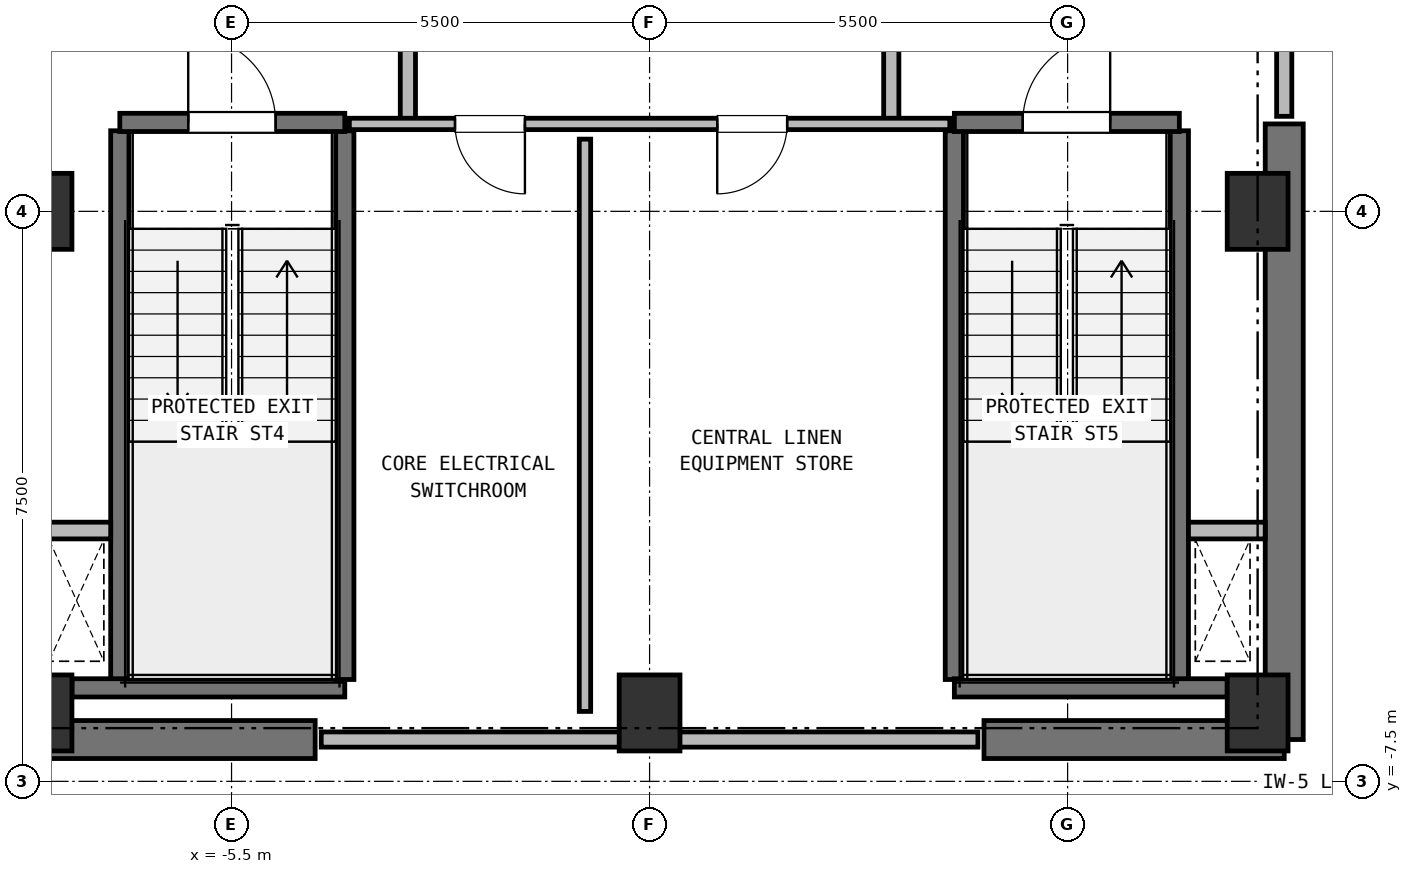
"""IFC4 building model, lengths in metres.
Left out: names, types, materials, properties, quantities, classifications, styles, units other than length and angle.
Written with IfcOpenShell. Run it as: python <this file> out.ifc"""

import sys

from ifc_helpers import new_model, si_unit, direction, frame, frame_2d, origin, origin_2d, place, context, subcontext, project, spatial, rectangle, extrude, element, fill, save


model = new_model("IFC4")
c1 = context("Model", 3, precision=1e-05, world=origin(), true_north=direction((0.0, 1.0)))
c2 = subcontext(c1, "Body", "Model", "MODEL_VIEW")
j1 = project(units=[si_unit("LENGTHUNIT", "METRE"), si_unit("PLANEANGLEUNIT", "RADIAN")], contexts=[c1])
p1 = place(None, origin())
s1 = spatial("IfcSite", under=j1, at=p1, CompositionType="ELEMENT")
p2 = place(p1, origin())
s2 = spatial("IfcBuilding", under=s1, at=p2, CompositionType="ELEMENT")
p3 = place(p2, frame((0.0, 0.0, 205.55)))
s3 = spatial("IfcBuildingStorey", under=s2, at=p3, CompositionType="ELEMENT", Elevation=205.55)
for number, where, z_axis, x_axis in (
    (1, (-8.0, -6.6, 0.0), (0.0, 0.0, 1.0), (1.0, 0.0, 0.0)),
    (2, (0.0, -6.6, 0.0), (0.0, 0.0, 1.0), (1.0, 0.0, 0.0)),
    (3, (8.0, -6.6, 0.0), (0.0, 0.0, 1.0), (1.0, 0.0, 0.0)),
    (4, (8.0, 0.0, 0.0), (0.0, 0.0, 1.0), (1.0, 0.0, 0.0)),
    (5, (-8.0, 0.0, 0.0), (0.0, 0.0, 1.0), (1.0, 0.0, 0.0)),
):
    element("IfcColumn", number, at=place(p3, frame(where, z_axis=z_axis, x_axis=x_axis)), inside=s3, PredefinedType="COLUMN", context=c2, shape_type="SweptSolid", body=[
        extrude(rectangle(XDim=0.8, YDim=1.0, at=origin_2d()), origin(), (0.0, 0.0, 1.0), 3.8),
    ])
for number, where, z_axis, x_axis in (
    (6, (-8.35, -6.95, 0.0), (0.0, 0.0, 1.0), (1.0, 0.0, 0.0)),
    (7, (4.4, -6.95, 0.0), (0.0, 0.0, 1.0), (1.0, 0.0, 0.0)),
):
    element("IfcWall", number, at=place(p3, frame(where, z_axis=z_axis, x_axis=x_axis)), inside=s3, PredefinedType="SHEAR", context=c2, shape_type="SweptSolid", body=[
        extrude(rectangle(XDim=3.95, YDim=0.5, at=frame_2d((1.975, 0.0))), origin(), (0.0, 0.0, 1.0), 3.55),
    ])
p4 = place(p3, frame((8.35, -6.95, 0.0), z_axis=(0.0, 0.0, 1.0), x_axis=(0.0, 1.0, 0.0)))
e8 = element("IfcWall", 8, at=p4, inside=s3, PredefinedType="SHEAR", context=c2, shape_type="SweptSolid", body=[
    extrude(rectangle(XDim=8.1, YDim=0.5, at=frame_2d((4.05, 0.0))), origin(), (0.0, 0.0, 1.0), 3.55),
])
p5 = place(p3, frame((-6.97, -6.16, 0.0), z_axis=(0.0, 0.0, 1.0), x_axis=(0.0, 1.0, 0.0)))
e9 = element("IfcWall", 9, at=p5, inside=s3, PredefinedType="SHEAR", context=c2, shape_type="SweptSolid", body=[
    extrude(rectangle(XDim=7.22, YDim=0.24, at=frame_2d((3.61, 0.0))), origin(), (0.0, 0.0, 1.0), 3.55),
])
p6 = place(p3, frame((-7.6, -6.27, 0.0), z_axis=(0.0, 0.0, 1.0), x_axis=(1.0, 0.0, 0.0)))
e10 = element("IfcWall", 10, at=p6, inside=s3, PredefinedType="SHEAR", context=c2, shape_type="SweptSolid", body=[
    extrude(rectangle(XDim=3.59, YDim=0.24, at=frame_2d((1.795, 0.0))), origin(), (0.0, 0.0, 1.0), 3.55),
])
p7 = place(p3, frame((-4.01, -6.16, 0.0), z_axis=(0.0, 0.0, 1.0), x_axis=(0.0, 1.0, 0.0)))
e11 = element("IfcWall", 11, at=p7, inside=s3, PredefinedType="SHEAR", context=c2, shape_type="SweptSolid", body=[
    extrude(rectangle(XDim=7.22, YDim=0.24, at=frame_2d((3.61, 0.0))), origin(), (0.0, 0.0, 1.0), 3.55),
])
p8 = place(p3, frame((-6.97, 1.17, 0.0), z_axis=(0.0, 0.0, 1.0), x_axis=(1.0, 0.0, 0.0)))
e12 = element("IfcWall", 12, at=p8, inside=s3, PredefinedType="SHEAR", context=c2, shape_type="SweptSolid", body=[
    extrude(rectangle(XDim=2.96, YDim=0.24, at=frame_2d((1.48, 0.0))), origin(), (0.0, 0.0, 1.0), 3.55),
])
p9 = place(p8, frame((0.9, 0.0, 0.0)))
e13 = element("IfcOpeningElement", 13, at=p9, cuts=e12, PredefinedType="OPENING", context=c2, shape_type="SweptSolid", body=[
    extrude(rectangle(XDim=1.15, YDim=2.15, at=frame_2d((0.575, 1.075))), frame((0.0, 0.13, 0.0), z_axis=(0.0, -1.0, 0.0), x_axis=(1.0, 0.0, 0.0)), (0.0, 0.0, 1.0), 0.26),
])
for number, where, z_axis, x_axis in (
    (14, (4.01, -6.16, 0.0), (0.0, 0.0, 1.0), (0.0, 1.0, 0.0)),
    (15, (6.97, -6.16, 0.0), (0.0, 0.0, 1.0), (0.0, 1.0, 0.0)),
):
    element("IfcWall", number, at=place(p3, frame(where, z_axis=z_axis, x_axis=x_axis)), inside=s3, PredefinedType="SHEAR", context=c2, shape_type="SweptSolid", body=[
        extrude(rectangle(XDim=7.22, YDim=0.24, at=frame_2d((3.61, 0.0))), origin(), (0.0, 0.0, 1.0), 3.55),
    ])
p10 = place(p3, frame((4.01, -6.27, 0.0), z_axis=(0.0, 0.0, 1.0), x_axis=(1.0, 0.0, 0.0)))
e16 = element("IfcWall", 16, at=p10, inside=s3, PredefinedType="SHEAR", context=c2, shape_type="SweptSolid", body=[
    extrude(rectangle(XDim=3.59, YDim=0.24, at=frame_2d((1.795, 0.0))), origin(), (0.0, 0.0, 1.0), 3.55),
])
p11 = place(p3, frame((4.01, 1.17, 0.0), z_axis=(0.0, 0.0, 1.0), x_axis=(1.0, 0.0, 0.0)))
e17 = element("IfcWall", 17, at=p11, inside=s3, PredefinedType="SHEAR", context=c2, shape_type="SweptSolid", body=[
    extrude(rectangle(XDim=2.96, YDim=0.24, at=frame_2d((1.48, 0.0))), origin(), (0.0, 0.0, 1.0), 3.55),
])
p12 = place(p11, frame((0.9, 0.0, 0.0)))
e18 = element("IfcOpeningElement", 18, at=p12, cuts=e17, PredefinedType="OPENING", context=c2, shape_type="SweptSolid", body=[
    extrude(rectangle(XDim=1.15, YDim=2.15, at=frame_2d((0.575, 1.075))), frame((0.0, 0.13, 0.0), z_axis=(0.0, -1.0, 0.0), x_axis=(1.0, 0.0, 0.0)), (0.0, 0.0, 1.0), 0.26),
])
for number, where, z_axis, x_axis in (
    (19, (-8.1, -4.2, 0.0), (0.0, 0.0, 1.0), (1.0, 0.0, 0.0)),
    (20, (7.09, -4.2, 0.0), (0.0, 0.0, 1.0), (1.0, 0.0, 0.0)),
):
    element("IfcWall", number, at=place(p3, frame(where, z_axis=z_axis, x_axis=x_axis)), inside=s3, PredefinedType="PARTITIONING", context=c2, shape_type="SweptSolid", body=[
        extrude(rectangle(XDim=1.01, YDim=0.22, at=frame_2d((0.505, 0.0))), origin(), (0.0, 0.0, 1.0), 3.55),
    ])
p13 = place(p3, frame((-3.18, 1.15, 0.0), z_axis=(0.0, 0.0, 1.0), x_axis=(0.0, 1.0, 0.0)))
e21 = element("IfcWall", 21, at=p13, inside=s3, PredefinedType="PARTITIONING", context=c2, shape_type="SweptSolid", body=[
    extrude(rectangle(XDim=3.3, YDim=0.2, at=frame_2d((1.65, 0.0))), origin(), (0.0, 0.0, 1.0), 3.55),
])
p14 = place(p13, frame((1.08, 0.0, 0.0)))
e22 = element("IfcOpeningElement", 22, at=p14, cuts=e21, PredefinedType="OPENING", context=c2, shape_type="SweptSolid", body=[
    extrude(rectangle(XDim=1.15, YDim=2.15, at=frame_2d((0.575, 1.075))), frame((0.0, 0.11, 0.0), z_axis=(0.0, -1.0, 0.0), x_axis=(1.0, 0.0, 0.0)), (0.0, 0.0, 1.0), 0.22),
])
p15 = place(p3, frame((3.18, 1.15, 0.0), z_axis=(0.0, 0.0, 1.0), x_axis=(0.0, 1.0, 0.0)))
e23 = element("IfcWall", 23, at=p15, inside=s3, PredefinedType="PARTITIONING", context=c2, shape_type="SweptSolid", body=[
    extrude(rectangle(XDim=3.3, YDim=0.2, at=frame_2d((1.65, 0.0))), origin(), (0.0, 0.0, 1.0), 3.55),
])
p16 = place(p15, frame((1.08, 0.0, 0.0)))
e24 = element("IfcOpeningElement", 24, at=p16, cuts=e23, PredefinedType="OPENING", context=c2, shape_type="SweptSolid", body=[
    extrude(rectangle(XDim=1.15, YDim=2.15, at=frame_2d((0.575, 1.075))), frame((0.0, 0.11, 0.0), z_axis=(0.0, -1.0, 0.0), x_axis=(1.0, 0.0, 0.0)), (0.0, 0.0, 1.0), 0.22),
])
p17 = place(p3, frame((8.35, 1.25, 0.0), z_axis=(0.0, 0.0, 1.0), x_axis=(0.0, 1.0, 0.0)))
e25 = element("IfcWall", 25, at=p17, inside=s3, PredefinedType="PARTITIONING", context=c2, shape_type="SweptSolid", body=[
    extrude(rectangle(XDim=5.3, YDim=0.2, at=frame_2d((2.65, 0.0))), origin(), (0.0, 0.0, 1.0), 3.55),
])
p18 = place(p17, frame((0.95, 0.0, 0.0)))
e26 = element("IfcOpeningElement", 26, at=p18, cuts=e25, PredefinedType="OPENING", context=c2, shape_type="SweptSolid", body=[
    extrude(rectangle(XDim=1.15, YDim=2.15, at=frame_2d((0.575, 1.075))), frame((0.0, 0.11, 0.0), z_axis=(0.0, -1.0, 0.0), x_axis=(1.0, 0.0, 0.0)), (0.0, 0.0, 1.0), 0.22),
])
p19 = place(p3, frame((3.95, 1.15, 0.0), z_axis=(0.0, 0.0, 1.0), x_axis=(-1.0, 0.0, 0.0)))
e27 = element("IfcWall", 27, at=p19, inside=s3, PredefinedType="PARTITIONING", context=c2, shape_type="SweptSolid", body=[
    extrude(rectangle(XDim=7.9, YDim=0.15, at=frame_2d((3.95, 0.0))), origin(), (0.0, 0.0, 1.0), 3.55),
])
p20 = place(p19, frame((5.59, 0.0, 0.0)))
e28 = element("IfcOpeningElement", 28, at=p20, cuts=e27, PredefinedType="OPENING", context=c2, shape_type="SweptSolid", body=[
    extrude(rectangle(XDim=0.92, YDim=2.05, at=frame_2d((0.46, 1.025))), frame((0.0, 0.085, 0.0), z_axis=(0.0, -1.0, 0.0), x_axis=(1.0, 0.0, 0.0)), (0.0, 0.0, 1.0), 0.17),
])
p21 = place(p19, frame((2.14, 0.0, 0.0)))
e29 = element("IfcOpeningElement", 29, at=p21, cuts=e27, PredefinedType="OPENING", context=c2, shape_type="SweptSolid", body=[
    extrude(rectangle(XDim=0.92, YDim=2.05, at=frame_2d((0.46, 1.025))), frame((0.0, 0.085, 0.0), z_axis=(0.0, -1.0, 0.0), x_axis=(1.0, 0.0, 0.0)), (0.0, 0.0, 1.0), 0.17),
])
p22 = place(p3, frame((-4.32, -6.95, 0.0), z_axis=(0.0, 0.0, 1.0), x_axis=(1.0, 0.0, 0.0)))
e30 = element("IfcWall", 30, at=p22, inside=s3, PredefinedType="PARTITIONING", context=c2, shape_type="SweptSolid", body=[
    extrude(rectangle(XDim=8.64, YDim=0.2, at=frame_2d((4.32, 0.0))), origin(), (0.0, 0.0, 1.0), 3.55),
])
p23 = place(p3, frame((-0.85, -6.58, 0.0), z_axis=(0.0, 0.0, 1.0), x_axis=(0.0, 1.0, 0.0)))
e31 = element("IfcWall", 31, at=p23, inside=s3, PredefinedType="PARTITIONING", context=c2, shape_type="SweptSolid", body=[
    extrude(rectangle(XDim=7.53, YDim=0.15, at=frame_2d((3.765, 0.0))), origin(), (0.0, 0.0, 1.0), 3.55),
])
p24 = place(p3, frame((10.422, -7.309, 0.0), z_axis=(0.0, 0.0, 1.0), x_axis=(-0.693764562202, -0.720201869085, 0.0)))
e32 = element("IfcWall", 32, at=p24, inside=s3, PredefinedType="PARTITIONING", context=c2, shape_type="SweptSolid", body=[
    extrude(rectangle(XDim=2.558, YDim=0.15, at=frame_2d((1.279, 0.0))), origin(), (0.0, 0.0, 1.0), 3.23),
])
p25 = place(p9, origin())
e33 = element("IfcDoor", 33, at=p25, inside=s3, OperationType="SINGLE_SWING_LEFT", PredefinedType="DOOR", context=c2, shape_type="SweptSolid", body=[
    extrude(rectangle(XDim=1.15, YDim=2.15, at=frame_2d((0.575, 1.075))), frame((0.0, 0.025, 0.0), z_axis=(0.0, -1.0, 0.0), x_axis=(1.0, 0.0, 0.0)), (0.0, 0.0, 1.0), 0.05),
])
fill(e13, e33)
p26 = place(p12, origin())
e34 = element("IfcDoor", 34, at=p26, inside=s3, OperationType="SINGLE_SWING_RIGHT", PredefinedType="DOOR", context=c2, shape_type="SweptSolid", body=[
    extrude(rectangle(XDim=1.15, YDim=2.15, at=frame_2d((0.575, 1.075))), frame((0.0, 0.025, 0.0), z_axis=(0.0, -1.0, 0.0), x_axis=(1.0, 0.0, 0.0)), (0.0, 0.0, 1.0), 0.05),
])
fill(e18, e34)
p27 = place(p20, origin())
e35 = element("IfcDoor", 35, at=p27, inside=s3, OperationType="SINGLE_SWING_LEFT", PredefinedType="DOOR", context=c2, shape_type="SweptSolid", body=[
    extrude(rectangle(XDim=0.92, YDim=2.05, at=frame_2d((0.46, 1.025))), frame((0.0, 0.025, 0.0), z_axis=(0.0, -1.0, 0.0), x_axis=(1.0, 0.0, 0.0)), (0.0, 0.0, 1.0), 0.05),
])
fill(e28, e35)
p28 = place(p21, origin())
e36 = element("IfcDoor", 36, at=p28, inside=s3, OperationType="SINGLE_SWING_RIGHT", PredefinedType="DOOR", context=c2, shape_type="SweptSolid", body=[
    extrude(rectangle(XDim=0.92, YDim=2.05, at=frame_2d((0.46, 1.025))), frame((0.0, 0.025, 0.0), z_axis=(0.0, -1.0, 0.0), x_axis=(1.0, 0.0, 0.0)), (0.0, 0.0, 1.0), 0.05),
])
fill(e29, e36)
save(model, sys.argv[1])
